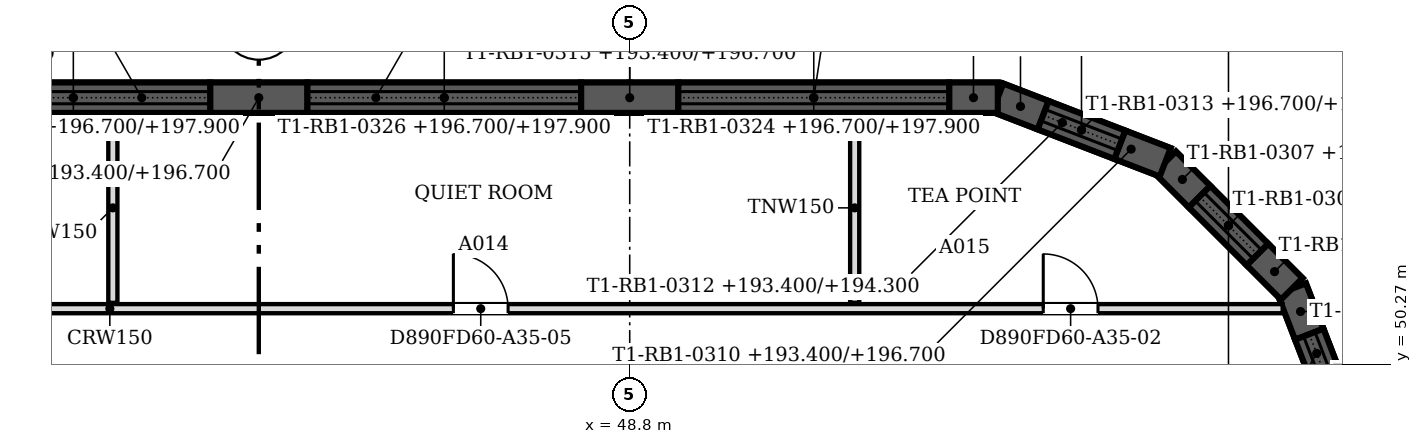
"""IFC4 building model, lengths in metres.
Left out: names, types, materials, properties, quantities, classifications, styles, units other than length and angle.
Written with IfcOpenShell. Run it as: python <this file> out.ifc"""

import sys

from ifc_helpers import new_model, si_unit, direction, frame, frame_2d, origin, place, context, subcontext, project, spatial, polyline, rectangle, outline, extrude, faceted_brep, source, transform, mapped, element, fill, save


model = new_model("IFC4")
c1 = context("Model", 3, precision=1e-05, world=origin(), true_north=direction((0.0, 1.0)))
c2 = subcontext(c1, "Body", "Model", "MODEL_VIEW")
j1 = project(units=[si_unit("LENGTHUNIT", "METRE"), si_unit("PLANEANGLEUNIT", "RADIAN")], contexts=[c1])
p1 = place(None, origin())
s1 = spatial("IfcSite", under=j1, at=p1, CompositionType="ELEMENT")
p2 = place(p1, origin())
s2 = spatial("IfcBuilding", under=s1, at=p2, CompositionType="ELEMENT")
p3 = place(p2, frame((0.0, 0.0, 193.4)))
s3 = spatial("IfcBuildingStorey", under=s2, at=p3, CompositionType="ELEMENT", Elevation=193.4)
m1 = source(origin(), c2, "Body", "Brep", [
    faceted_brep([(0.0, -0.25, 0.0), (0.8, -0.25, 0.0), (0.8, -0.25, 3.3), (0.0, -0.25, 3.3), (0.0, 0.25, 3.3), (0.747, 0.25, 3.3), (0.747, 0.25, 0.0), (0.0, 0.25, 0.0), (0.8, -0.0, 0.0), (0.8, -0.0, 3.3)], [[[0, 1, 2, 3]], [[4, 5, 6, 7]], [[7, 6, 8, 1, 0]], [[9, 2, 1, 8]], [[5, 4, 3, 2, 9]], [[4, 7, 0, 3]], [[8, 6, 5, 9]]]),
])
p4 = place(p3, frame((59.976, 50.76, 0.0), z_axis=(0.0, 0.0, 1.0), x_axis=(-0.360001058183, 0.932951894851, 0.0)))
e1 = element("IfcWall", 1, at=p4, inside=s3, PredefinedType="SOLIDWALL", context=c2, shape_type="MappedRepresentation", body=[
    mapped(m1, transform((0.0, 0.0, 0.0), scale=1.0)),
])
m2 = source(origin(), c2, "Body", "SweptSolid", [
    extrude(outline(polyline([(0.0, 0.0), (1.351, 0.0), (1.351, 0.9), (0.0, 0.9), (0.0, 0.0)])), frame((0.0, 0.25, 0.0), z_axis=(0.0, -1.0, 0.0), x_axis=(1.0, 0.0, 0.0)), (0.0, 0.0, 1.0), 0.5),
])
p5 = place(p3, frame((60.462, 49.5, 0.0), z_axis=(0.0, 0.0, 1.0), x_axis=(-0.359923772835, 0.932981713512, 0.0)))
e2 = element("IfcWall", 2, at=p5, inside=s3, PredefinedType="SOLIDWALL", context=c2, shape_type="MappedRepresentation", body=[
    mapped(m2, transform((0.0, 0.0, 0.0), scale=1.0)),
])
m3 = source(origin(), c2, "Body", "Brep", [
    faceted_brep([(0.0, -0.25, 0.0), (2.95, -0.25, 0.0), (2.95, -0.25, 1.2), (0.0, -0.25, 1.2), (0.047, 0.25, 1.2), (2.898, 0.25, 1.2), (2.898, 0.25, 0.0), (0.047, 0.25, 0.0), (2.95, 0.0, 0.0), (0.0, 0.0, 0.0), (2.95, 0.0, 1.2), (0.0, 0.0, 1.2)], [[[0, 1, 2, 3]], [[4, 5, 6, 7]], [[7, 6, 8, 1, 0, 9]], [[10, 2, 1, 8]], [[5, 4, 11, 3, 2, 10]], [[9, 0, 3, 11]], [[7, 9, 11, 4]], [[8, 6, 5, 10]]]),
])
p6 = place(p3, frame((60.75, 48.753, 3.3), z_axis=(0.0, 0.0, 1.0), x_axis=(-0.359877213415, 0.932999673775, 0.0)))
e3 = element("IfcWall", 3, at=p6, inside=s3, PredefinedType="SOLIDWALL", context=c2, shape_type="MappedRepresentation", body=[
    mapped(m3, transform((0.0, 0.0, 0.0), scale=1.0)),
])
m4 = source(origin(), c2, "Body", "Brep", [
    faceted_brep([(0.0, -0.25, 0.0), (0.8, -0.25, 0.0), (0.8, -0.25, 3.3), (0.0, -0.25, 3.3), (0.053, 0.25, 3.3), (0.8, 0.25, 3.3), (0.8, 0.25, 0.0), (0.053, 0.25, 0.0), (0.0, 0.0, 0.0), (0.0, 0.0, 3.3)], [[[0, 1, 2, 3]], [[4, 5, 6, 7]], [[7, 6, 1, 0, 8]], [[5, 4, 9, 3, 2]], [[8, 0, 3, 9]], [[7, 8, 9, 4]], [[1, 6, 5, 2]]]),
])
p7 = place(p3, frame((59.688, 51.506, 0.0), z_axis=(0.0, 0.0, 1.0), x_axis=(-0.707106781187, 0.707106781187, 0.0)))
e4 = element("IfcWall", 4, at=p7, inside=s3, PredefinedType="SOLIDWALL", context=c2, shape_type="MappedRepresentation", body=[
    mapped(m4, transform((0.0, 0.0, 0.0), scale=1.0)),
])
m5 = source(origin(), c2, "Body", "Brep", [
    faceted_brep([(0.0, -0.25, 0.0), (0.8, -0.25, 0.0), (0.8, -0.25, 3.3), (0.0, -0.25, 3.3), (0.0, 0.25, 3.3), (0.747, 0.25, 3.3), (0.747, 0.25, 0.0), (0.0, 0.25, 0.0), (0.8, -0.0, 0.0), (0.8, -0.0, 3.3)], [[[0, 1, 2, 3]], [[4, 5, 6, 7]], [[7, 6, 8, 1, 0]], [[9, 2, 1, 8]], [[5, 4, 3, 2, 9]], [[4, 7, 0, 3]], [[8, 6, 5, 9]]]),
])
p8 = place(p3, frame((58.172, 53.022, 0.0), z_axis=(0.0, 0.0, 1.0), x_axis=(-0.707106781187, 0.707106781187, 0.0)))
e5 = element("IfcWall", 5, at=p8, inside=s3, PredefinedType="SOLIDWALL", context=c2, shape_type="MappedRepresentation", body=[
    mapped(m5, transform((0.0, 0.0, 0.0), scale=1.0)),
])
m6 = source(origin(), c2, "Body", "SweptSolid", [
    extrude(outline(polyline([(0.0, 0.0), (1.344, 0.0), (1.344, 0.9), (0.0, 0.9), (0.0, 0.0)])), frame((0.0, 0.25, 0.0), z_axis=(0.0, -1.0, 0.0), x_axis=(1.0, 0.0, 0.0)), (0.0, 0.0, 1.0), 0.5),
])
p9 = place(p3, frame((59.122, 52.072, 0.0), z_axis=(0.0, 0.0, 1.0), x_axis=(-0.707106781187, 0.707106781187, 0.0)))
e6 = element("IfcWall", 6, at=p9, inside=s3, PredefinedType="SOLIDWALL", context=c2, shape_type="MappedRepresentation", body=[
    mapped(m6, transform((0.0, 0.0, 0.0), scale=1.0)),
])
m7 = source(origin(), c2, "Body", "Brep", [
    faceted_brep([(0.0, -0.25, 0.0), (2.944, -0.25, 0.0), (2.944, -0.25, 1.2), (0.0, -0.25, 1.2), (0.053, 0.25, 1.2), (2.891, 0.25, 1.2), (2.891, 0.25, 0.0), (0.053, 0.25, 0.0), (2.944, 0.0, 0.0), (0.0, 0.0, 0.0), (2.944, 0.0, 1.2), (0.0, 0.0, 1.2)], [[[0, 1, 2, 3]], [[4, 5, 6, 7]], [[7, 6, 8, 1, 0, 9]], [[10, 2, 1, 8]], [[5, 4, 11, 3, 2, 10]], [[9, 0, 3, 11]], [[7, 9, 11, 4]], [[8, 6, 5, 10]]]),
])
p10 = place(p3, frame((59.688, 51.506, 3.3), z_axis=(0.0, 0.0, 1.0), x_axis=(-0.707106781187, 0.707106781187, 0.0)))
e7 = element("IfcWall", 7, at=p10, inside=s3, PredefinedType="SOLIDWALL", context=c2, shape_type="MappedRepresentation", body=[
    mapped(m7, transform((0.0, 0.0, 0.0), scale=1.0)),
])
m8 = source(origin(), c2, "Body", "Brep", [
    faceted_brep([(0.0, -0.25, 0.0), (0.8, -0.25, 0.0), (0.8, -0.25, 3.3), (0.0, -0.25, 3.3), (0.053, 0.25, 3.3), (0.8, 0.25, 3.3), (0.8, 0.25, 0.0), (0.053, 0.25, 0.0), (0.0, 0.0, 0.0), (0.0, 0.0, 3.3)], [[[0, 1, 2, 3]], [[4, 5, 6, 7]], [[7, 6, 1, 0, 8]], [[5, 4, 9, 3, 2]], [[8, 0, 3, 9]], [[7, 8, 9, 4]], [[1, 6, 5, 2]]]),
])
p11 = place(p3, frame((57.606, 53.588, 0.0), z_axis=(0.0, 0.0, 1.0), x_axis=(-0.93301483327, 0.3598379092, 0.0)))
e8 = element("IfcWall", 8, at=p11, inside=s3, PredefinedType="SOLIDWALL", context=c2, shape_type="MappedRepresentation", body=[
    mapped(m8, transform((0.0, 0.0, 0.0), scale=1.0)),
])
m9 = source(origin(), c2, "Body", "Brep", [
    faceted_brep([(0.0, -0.25, 0.0), (0.8, -0.25, 0.0), (0.8, -0.25, 3.3), (0.0, -0.25, 3.3), (0.0, 0.25, 3.3), (0.753, 0.25, 3.3), (0.753, 0.25, 0.0), (0.0, 0.25, 0.0), (0.8, -0.0, 0.0), (0.8, -0.0, 3.3)], [[[0, 1, 2, 3]], [[4, 5, 6, 7]], [[7, 6, 8, 1, 0]], [[9, 2, 1, 8]], [[5, 4, 3, 2, 9]], [[4, 7, 0, 3]], [[8, 6, 5, 9]]]),
])
p12 = place(p3, frame((55.6, 54.362, 0.0), z_axis=(0.0, 0.0, 1.0), x_axis=(-0.93301483327, 0.3598379092, 0.0)))
e9 = element("IfcWall", 9, at=p12, inside=s3, PredefinedType="SOLIDWALL", context=c2, shape_type="MappedRepresentation", body=[
    mapped(m9, transform((0.0, 0.0, 0.0), scale=1.0)),
])
p13 = place(p3, frame((56.86, 53.876, 0.0), z_axis=(0.0, 0.0, 1.0), x_axis=(-0.932981713512, 0.359923772835, 0.0)))
e10 = element("IfcWall", 10, at=p13, inside=s3, PredefinedType="SOLIDWALL", context=c2, shape_type="MappedRepresentation", body=[
    mapped(m2, transform((0.0, 0.0, 0.0), scale=1.0)),
])
m10 = source(origin(), c2, "Body", "Brep", [
    faceted_brep([(0.0, -0.25, 0.0), (2.95, -0.25, 0.0), (2.95, -0.25, 1.2), (0.0, -0.25, 1.2), (0.053, 0.25, 1.2), (2.904, 0.25, 1.2), (2.904, 0.25, 0.0), (0.053, 0.25, 0.0), (2.95, 0.0, 0.0), (0.0, 0.0, 0.0), (2.95, 0.0, 1.2), (0.0, 0.0, 1.2)], [[[0, 1, 2, 3]], [[4, 5, 6, 7]], [[7, 6, 8, 1, 0, 9]], [[10, 2, 1, 8]], [[5, 4, 11, 3, 2, 10]], [[9, 0, 3, 11]], [[7, 9, 11, 4]], [[8, 6, 5, 10]]]),
])
p14 = place(p3, frame((57.606, 53.588, 3.3), z_axis=(0.0, 0.0, 1.0), x_axis=(-0.932999673775, 0.359877213415, 0.0)))
e11 = element("IfcWall", 11, at=p14, inside=s3, PredefinedType="SOLIDWALL", context=c2, shape_type="MappedRepresentation", body=[
    mapped(m10, transform((0.0, 0.0, 0.0), scale=1.0)),
])
m11 = source(origin(), c2, "Body", "Brep", [
    faceted_brep([(0.0, -0.25, 0.0), (0.8, -0.25, 0.0), (0.8, -0.25, 3.3), (0.0, -0.25, 3.3), (0.047, 0.25, 3.3), (0.8, 0.25, 3.3), (0.8, 0.25, 0.0), (0.047, 0.25, 0.0), (0.0, 0.0, 0.0), (0.0, 0.0, 3.3)], [[[0, 1, 2, 3]], [[4, 5, 6, 7]], [[7, 6, 1, 0, 8]], [[5, 4, 9, 3, 2]], [[8, 0, 3, 9]], [[7, 8, 9, 4]], [[1, 6, 5, 2]]]),
])
p15 = place(p3, frame((54.854, 54.65, 0.0), z_axis=(0.0, 0.0, 1.0), x_axis=(-1.0, 0.0, 0.0)))
e12 = element("IfcWall", 12, at=p15, inside=s3, PredefinedType="SOLIDWALL", context=c2, shape_type="MappedRepresentation", body=[
    mapped(m11, transform((0.0, 0.0, 0.0), scale=1.0)),
])
m12 = source(origin(), c2, "Body", "SweptSolid", [
    extrude(outline(polyline([(0.0, 0.0), (1.6, 0.0), (1.6, 3.3), (0.0, 3.3), (0.0, 0.0)])), frame((0.0, 0.25, 0.0), z_axis=(0.0, -1.0, 0.0), x_axis=(1.0, 0.0, 0.0)), (0.0, 0.0, 1.0), 0.5),
])
for number, where, z_axis, x_axis in (
    (13, (49.6, 54.65, 0.0), (0.0, 0.0, 1.0), (-1.0, 0.0, 0.0)),
    (14, (43.5, 54.65, 0.0), (0.0, 0.0, 1.0), (-1.0, 0.0, 0.0)),
):
    element("IfcWall", number, at=place(p3, frame(where, z_axis=z_axis, x_axis=x_axis)), inside=s3, PredefinedType="SOLIDWALL", context=c2, shape_type="MappedRepresentation", body=[
        mapped(m12, transform((0.0, 0.0, 0.0), scale=1.0)),
    ])
m13 = source(origin(), c2, "Body", "SweptSolid", [
    extrude(outline(polyline([(0.0, 0.0), (4.453, 0.0), (4.453, 0.9), (0.0, 0.9), (0.0, 0.0)])), frame((0.0, 0.25, 0.0), z_axis=(0.0, -1.0, 0.0), x_axis=(1.0, 0.0, 0.0)), (0.0, 0.0, 1.0), 0.5),
])
p16 = place(p3, frame((54.053, 54.65, 0.0), z_axis=(0.0, 0.0, 1.0), x_axis=(-1.0, 0.0, 0.0)))
e15 = element("IfcWall", 15, at=p16, inside=s3, PredefinedType="SOLIDWALL", context=c2, shape_type="MappedRepresentation", body=[
    mapped(m13, transform((0.0, 0.0, 0.0), scale=1.0)),
])
m14 = source(origin(), c2, "Body", "Brep", [
    faceted_brep([(0.0, -0.25, 0.0), (6.053, -0.25, 0.0), (6.053, -0.25, 1.2), (0.0, -0.25, 1.2), (0.047, 0.25, 1.2), (6.053, 0.25, 1.2), (6.053, 0.25, 0.0), (0.047, 0.25, 0.0), (0.0, 0.0, 0.0), (0.0, 0.0, 1.2)], [[[0, 1, 2, 3]], [[4, 5, 6, 7]], [[7, 6, 1, 0, 8]], [[5, 4, 9, 3, 2]], [[8, 0, 3, 9]], [[7, 8, 9, 4]], [[1, 6, 5, 2]]]),
])
p17 = place(p3, frame((54.854, 54.65, 3.3), z_axis=(0.0, 0.0, 1.0), x_axis=(-1.0, 0.0, 0.0)))
e16 = element("IfcWall", 16, at=p17, inside=s3, PredefinedType="SOLIDWALL", context=c2, shape_type="MappedRepresentation", body=[
    mapped(m14, transform((0.0, 0.0, 0.0), scale=1.0)),
])
m15 = source(origin(), c2, "Body", "SweptSolid", [
    extrude(outline(polyline([(0.0, 0.0), (4.5, 0.0), (4.5, 0.9), (0.0, 0.9), (0.0, 0.0)])), frame((0.0, 0.25, 0.0), z_axis=(0.0, -1.0, 0.0), x_axis=(1.0, 0.0, 0.0)), (0.0, 0.0, 1.0), 0.5),
])
p18 = place(p3, frame((48.0, 54.65, 0.0), z_axis=(0.0, 0.0, 1.0), x_axis=(-1.0, 0.0, 0.0)))
e17 = element("IfcWall", 17, at=p18, inside=s3, PredefinedType="SOLIDWALL", context=c2, shape_type="MappedRepresentation", body=[
    mapped(m15, transform((0.0, 0.0, 0.0), scale=1.0)),
])
m16 = source(origin(), c2, "Body", "SweptSolid", [
    extrude(outline(polyline([(0.0, 0.0), (6.1, 0.0), (6.1, 1.2), (0.0, 1.2), (0.0, 0.0)])), frame((0.0, 0.25, 0.0), z_axis=(0.0, -1.0, 0.0), x_axis=(1.0, 0.0, 0.0)), (0.0, 0.0, 1.0), 0.5),
])
p19 = place(p3, frame((48.8, 54.65, 3.3), z_axis=(0.0, 0.0, 1.0), x_axis=(-1.0, 0.0, 0.0)))
e18 = element("IfcWall", 18, at=p19, inside=s3, PredefinedType="SOLIDWALL", context=c2, shape_type="MappedRepresentation", body=[
    mapped(m16, transform((0.0, 0.0, 0.0), scale=1.0)),
])
p20 = place(p3, frame((41.9, 54.65, 0.0), z_axis=(0.0, 0.0, 1.0), x_axis=(-1.0, 0.0, 0.0)))
e19 = element("IfcWall", 19, at=p20, inside=s3, PredefinedType="SOLIDWALL", context=c2, shape_type="MappedRepresentation", body=[
    mapped(m15, transform((0.0, 0.0, 0.0), scale=1.0)),
])
m17 = source(origin(), c2, "Body", "Brep", [
    faceted_brep([(0.0, -0.25, 0.0), (6.1, -0.25, 0.0), (6.1, -0.25, 1.2), (0.0, -0.25, 1.2), (0.0, 0.25, 1.2), (6.1, 0.25, 1.2), (6.1, 0.25, 0.0), (0.0, 0.25, 0.0)], [[[0, 1, 2, 3]], [[4, 5, 6, 7]], [[7, 6, 1, 0]], [[5, 4, 3, 2]], [[4, 7, 0, 3]], [[1, 6, 5, 2]]]),
])
p21 = place(p3, frame((42.7, 54.65, 3.3), z_axis=(0.0, 0.0, 1.0), x_axis=(-1.0, 0.0, 0.0)))
e20 = element("IfcWall", 20, at=p21, inside=s3, PredefinedType="SOLIDWALL", context=c2, shape_type="MappedRepresentation", body=[
    mapped(m17, transform((0.0, 0.0, 0.0), scale=1.0)),
])
p22 = place(p3, frame((28.1, 51.18, 0.0), z_axis=(0.0, 0.0, 1.0), x_axis=(1.0, 0.0, 0.0)))
e21 = element("IfcWall", 21, at=p22, inside=s3, PredefinedType="PARTITIONING", context=c2, shape_type="SweptSolid", body=[
    extrude(rectangle(XDim=31.438, YDim=0.15, at=frame_2d((15.719, 0.0))), origin(), (0.0, 0.0, 1.0), 3.767),
])
m18 = source(origin(), c2, "Body", "SweptSolid", [
    extrude(rectangle(XDim=0.9, YDim=2.1, at=frame_2d((0.45, 1.05))), frame((0.0, 0.085, 0.0), z_axis=(0.0, -1.0, 0.0), x_axis=(1.0, 0.0, 0.0)), (0.0, 0.0, 1.0), 0.17),
])
p23 = place(p22, frame((27.501, 0.0, 0.0)))
e22 = element("IfcOpeningElement", 22, at=p23, cuts=e21, PredefinedType="OPENING", context=c2, shape_type="MappedRepresentation", body=[
    mapped(m18, transform((0.0, 0.0, 0.0), scale=1.0)),
])
p24 = place(p22, frame((5.6, 0.0, 0.0)))
e23 = element("IfcOpeningElement", 23, at=p24, cuts=e21, PredefinedType="OPENING", context=c2, shape_type="MappedRepresentation", body=[
    mapped(m18, transform((0.0, 0.0, 0.0), scale=1.0)),
])
p25 = place(p22, frame((17.8, 0.0, 0.0)))
e24 = element("IfcOpeningElement", 24, at=p25, cuts=e21, PredefinedType="OPENING", context=c2, shape_type="MappedRepresentation", body=[
    mapped(m18, transform((0.0, 0.0, 0.0), scale=1.0)),
])
for number, where, z_axis, x_axis in (
    (25, (40.3, 51.276, 0.0), (0.0, 0.0, 1.0), (0.0, 1.0, 0.0)),
    (26, (52.5, 51.276, 0.0), (0.0, 0.0, 1.0), (0.0, 1.0, 0.0)),
):
    element("IfcWall", number, at=place(p3, frame(where, z_axis=z_axis, x_axis=x_axis)), inside=s3, PredefinedType="PARTITIONING", context=c2, shape_type="SweptSolid", body=[
        extrude(rectangle(XDim=3.124, YDim=0.15, at=frame_2d((1.562, 0.0))), origin(), (0.0, 0.0, 1.0), 3.767),
    ])
m19 = source(origin(), c2, "Body", "SweptSolid", [
    extrude(rectangle(XDim=0.9, YDim=2.1, at=frame_2d((0.45, 1.05))), frame((0.0, 0.025, 0.0), z_axis=(0.0, -1.0, 0.0), x_axis=(1.0, 0.0, 0.0)), (0.0, 0.0, 1.0), 0.05),
])
p26 = place(p23, origin())
e27 = element("IfcDoor", 27, at=p26, inside=s3, OperationType="SINGLE_SWING_LEFT", PredefinedType="DOOR", context=c2, shape_type="MappedRepresentation", body=[
    mapped(m19, transform((0.0, 0.0, 0.0), scale=1.0)),
])
fill(e22, e27)
p27 = place(p25, origin())
e28 = element("IfcDoor", 28, at=p27, inside=s3, OperationType="SINGLE_SWING_LEFT", PredefinedType="DOOR", context=c2, shape_type="MappedRepresentation", body=[
    mapped(m19, transform((0.0, 0.0, 0.0), scale=1.0)),
])
fill(e24, e28)
save(model, sys.argv[1])
